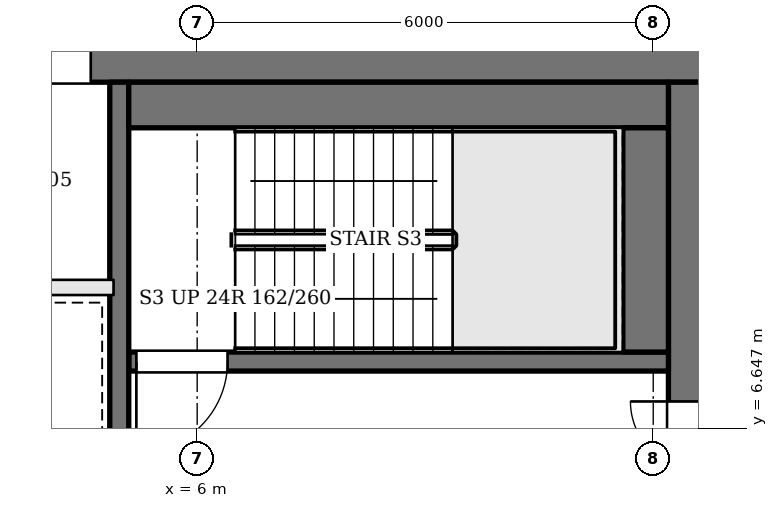
"""IFC4 building model, lengths in metres.
Left out: names, types, materials, properties, quantities, classifications, styles, units other than length and angle.
Written with IfcOpenShell. Run it as: python <this file> out.ifc"""

import sys

from ifc_helpers import new_model, si_unit, direction, frame, frame_2d, origin, place, context, subcontext, project, spatial, rectangle, extrude, element, fill, save


model = new_model("IFC4")
c1 = context("Model", 3, precision=1e-05, world=origin(), true_north=direction((0.0, 1.0)))
c2 = subcontext(c1, "Body", "Model", "MODEL_VIEW")
j1 = project(units=[si_unit("LENGTHUNIT", "METRE"), si_unit("PLANEANGLEUNIT", "RADIAN")], contexts=[c1])
p1 = place(None, origin())
s1 = spatial("IfcSite", under=j1, at=p1, CompositionType="ELEMENT")
p2 = place(p1, origin())
s2 = spatial("IfcBuilding", under=s1, at=p2, CompositionType="ELEMENT")
p3 = place(p2, frame((0.0, 0.0, 292.2)))
s3 = spatial("IfcBuildingStorey", under=s2, at=p3, CompositionType="ELEMENT", Elevation=292.2)
p4 = place(p3, frame((-13.0, 11.6, 0.0), z_axis=(0.0, 0.0, 1.0), x_axis=(1.0, 0.0, 0.0)))
e1 = element("IfcWall", 1, at=p4, inside=s3, PredefinedType="SHEAR", context=c2, shape_type="SweptSolid", body=[
    extrude(rectangle(XDim=26.0, YDim=0.8, at=frame_2d((13.0, 0.0))), origin(), (0.0, 0.0, 1.0), 3.9),
])
p5 = place(p4, frame((9.65, 0.0, 0.0)))
e2 = element("IfcOpeningElement", 2, at=p5, cuts=e1, PredefinedType="OPENING", context=c2, shape_type="SweptSolid", body=[
    extrude(rectangle(XDim=1.0, YDim=2.1, at=frame_2d((0.5, 1.05))), frame((0.0, 0.41, 0.0), z_axis=(0.0, -1.0, 0.0), x_axis=(1.0, 0.0, 0.0)), (0.0, 0.0, 1.0), 0.82),
])
p6 = place(p4, frame((12.675, 0.0, 0.0)))
e3 = element("IfcOpeningElement", 3, at=p6, cuts=e1, PredefinedType="OPENING", context=c2, shape_type="SweptSolid", body=[
    extrude(rectangle(XDim=0.7, YDim=2.1, at=frame_2d((0.35, 1.05))), frame((0.0, 0.41, 0.0), z_axis=(0.0, -1.0, 0.0), x_axis=(1.0, 0.0, 0.0)), (0.0, 0.0, 1.0), 0.82),
])
p7 = place(p4, frame((14.725, 0.0, 0.0)))
e4 = element("IfcOpeningElement", 4, at=p7, cuts=e1, PredefinedType="OPENING", context=c2, shape_type="SweptSolid", body=[
    extrude(rectangle(XDim=0.7, YDim=2.1, at=frame_2d((0.35, 1.05))), frame((0.0, 0.41, 0.0), z_axis=(0.0, -1.0, 0.0), x_axis=(1.0, 0.0, 0.0)), (0.0, 0.0, 1.0), 0.82),
])
p8 = place(p4, frame((16.6, 0.0, 0.0)))
e5 = element("IfcOpeningElement", 5, at=p8, cuts=e1, PredefinedType="OPENING", context=c2, shape_type="SweptSolid", body=[
    extrude(rectangle(XDim=1.0, YDim=2.1, at=frame_2d((0.5, 1.05))), frame((0.0, 0.41, 0.0), z_axis=(0.0, -1.0, 0.0), x_axis=(1.0, 0.0, 0.0)), (0.0, 0.0, 1.0), 0.82),
])
p9 = place(p3, frame((12.6, -2.2, 0.0), z_axis=(0.0, 0.0, 1.0), x_axis=(0.0, 1.0, 0.0)))
e6 = element("IfcWall", 6, at=p9, inside=s3, PredefinedType="SHEAR", context=c2, shape_type="SweptSolid", body=[
    extrude(rectangle(XDim=13.4, YDim=0.8, at=frame_2d((6.7, 0.0))), origin(), (0.0, 0.0, 1.0), 3.9),
])
p10 = place(p9, frame((7.4, 0.0, 0.0)))
e7 = element("IfcOpeningElement", 7, at=p10, cuts=e6, PredefinedType="OPENING", context=c2, shape_type="SweptSolid", body=[
    extrude(rectangle(XDim=1.8, YDim=2.1, at=frame_2d((0.9, 1.05))), frame((0.0, 0.41, 0.0), z_axis=(0.0, -1.0, 0.0), x_axis=(1.0, 0.0, 0.0)), (0.0, 0.0, 1.0), 0.82),
])
p11 = place(p3, frame((12.2, 7.525, 0.0), z_axis=(0.0, 0.0, 1.0), x_axis=(-1.0, 0.0, 0.0)))
e8 = element("IfcWall", 8, at=p11, inside=s3, PredefinedType="SOLIDWALL", context=c2, shape_type="SweptSolid", body=[
    extrude(rectangle(XDim=7.1, YDim=0.25, at=frame_2d((3.55, 0.0))), origin(), (0.0, 0.0, 1.0), 3.7),
])
p12 = place(p11, frame((5.8, 0.0, 0.0)))
e9 = element("IfcOpeningElement", 9, at=p12, cuts=e8, PredefinedType="OPENING", context=c2, shape_type="SweptSolid", body=[
    extrude(rectangle(XDim=1.2, YDim=2.1, at=frame_2d((0.6, 1.05))), frame((0.0, 0.135, 0.0), z_axis=(0.0, -1.0, 0.0), x_axis=(1.0, 0.0, 0.0)), (0.0, 0.0, 1.0), 0.27),
])
p13 = place(p3, frame((4.975, 11.2, 0.0), z_axis=(0.0, 0.0, 1.0), x_axis=(0.0, -1.0, 0.0)))
e10 = element("IfcWall", 10, at=p13, inside=s3, PredefinedType="SOLIDWALL", context=c2, shape_type="SweptSolid", body=[
    extrude(rectangle(XDim=13.4, YDim=0.25, at=frame_2d((6.7, 0.0))), origin(), (0.0, 0.0, 1.0), 3.7),
])
p14 = place(p13, frame((5.25, 0.0, 0.0)))
e11 = element("IfcOpeningElement", 11, at=p14, cuts=e10, PredefinedType="OPENING", context=c2, shape_type="SweptSolid", body=[
    extrude(rectangle(XDim=1.2, YDim=2.1, at=frame_2d((0.6, 1.05))), frame((0.0, 0.135, 0.0), z_axis=(0.0, -1.0, 0.0), x_axis=(1.0, 0.0, 0.0)), (0.0, 0.0, 1.0), 0.27),
])
p15 = place(p3, frame((12.2, 10.9, 0.0), z_axis=(0.0, 0.0, 1.0), x_axis=(-1.0, 0.0, 0.0)))
e12 = element("IfcWall", 12, at=p15, inside=s3, PredefinedType="SOLIDWALL", context=c2, shape_type="SweptSolid", body=[
    extrude(rectangle(XDim=7.1, YDim=0.6, at=frame_2d((3.55, 0.0))), origin(), (0.0, 0.0, 1.0), 3.7),
])
p16 = place(p3, frame((11.9, 10.6, 0.0), z_axis=(0.0, 0.0, 1.0), x_axis=(0.0, -1.0, 0.0)))
e13 = element("IfcWall", 13, at=p16, inside=s3, PredefinedType="SOLIDWALL", context=c2, shape_type="SweptSolid", body=[
    extrude(rectangle(XDim=2.95, YDim=0.6, at=frame_2d((1.475, 0.0))), origin(), (0.0, 0.0, 1.0), 3.7),
])
p17 = place(p3, frame((-4.9, 8.5, 0.0), z_axis=(0.0, 0.0, 1.0), x_axis=(1.0, 0.0, 0.0)))
e14 = element("IfcWall", 14, at=p17, inside=s3, PredefinedType="SOLIDWALL", context=c2, shape_type="SweptSolid", body=[
    extrude(rectangle(XDim=9.8, YDim=0.2, at=frame_2d((4.9, 0.0))), origin(), (0.0, 0.0, 1.0), 3.7),
])
p18 = place(p10, origin())
e15 = element("IfcDoor", 15, at=p18, inside=s3, OperationType="DOUBLE_DOOR_SINGLE_SWING", PredefinedType="DOOR", context=c2, shape_type="SweptSolid", body=[
    extrude(rectangle(XDim=1.8, YDim=2.1, at=frame_2d((0.9, 1.05))), frame((0.0, 0.025, 0.0), z_axis=(0.0, -1.0, 0.0), x_axis=(1.0, 0.0, 0.0)), (0.0, 0.0, 1.0), 0.05),
])
fill(e7, e15)
p19 = place(p12, origin())
e16 = element("IfcDoor", 16, at=p19, inside=s3, OperationType="SINGLE_SWING_RIGHT", PredefinedType="DOOR", context=c2, shape_type="SweptSolid", body=[
    extrude(rectangle(XDim=1.2, YDim=2.1, at=frame_2d((0.6, 1.05))), frame((0.0, 0.025, 0.0), z_axis=(0.0, -1.0, 0.0), x_axis=(1.0, 0.0, 0.0)), (0.0, 0.0, 1.0), 0.05),
])
fill(e9, e16)
p20 = place(p8, origin())
e17 = element("IfcDoor", 17, at=p20, inside=s3, OperationType="SINGLE_SWING_RIGHT", PredefinedType="DOOR", context=c2, shape_type="SweptSolid", body=[
    extrude(rectangle(XDim=1.0, YDim=2.1, at=frame_2d((0.5, 1.05))), frame((0.0, 0.025, 0.0), z_axis=(0.0, -1.0, 0.0), x_axis=(1.0, 0.0, 0.0)), (0.0, 0.0, 1.0), 0.05),
])
fill(e5, e17)
save(model, sys.argv[1])
